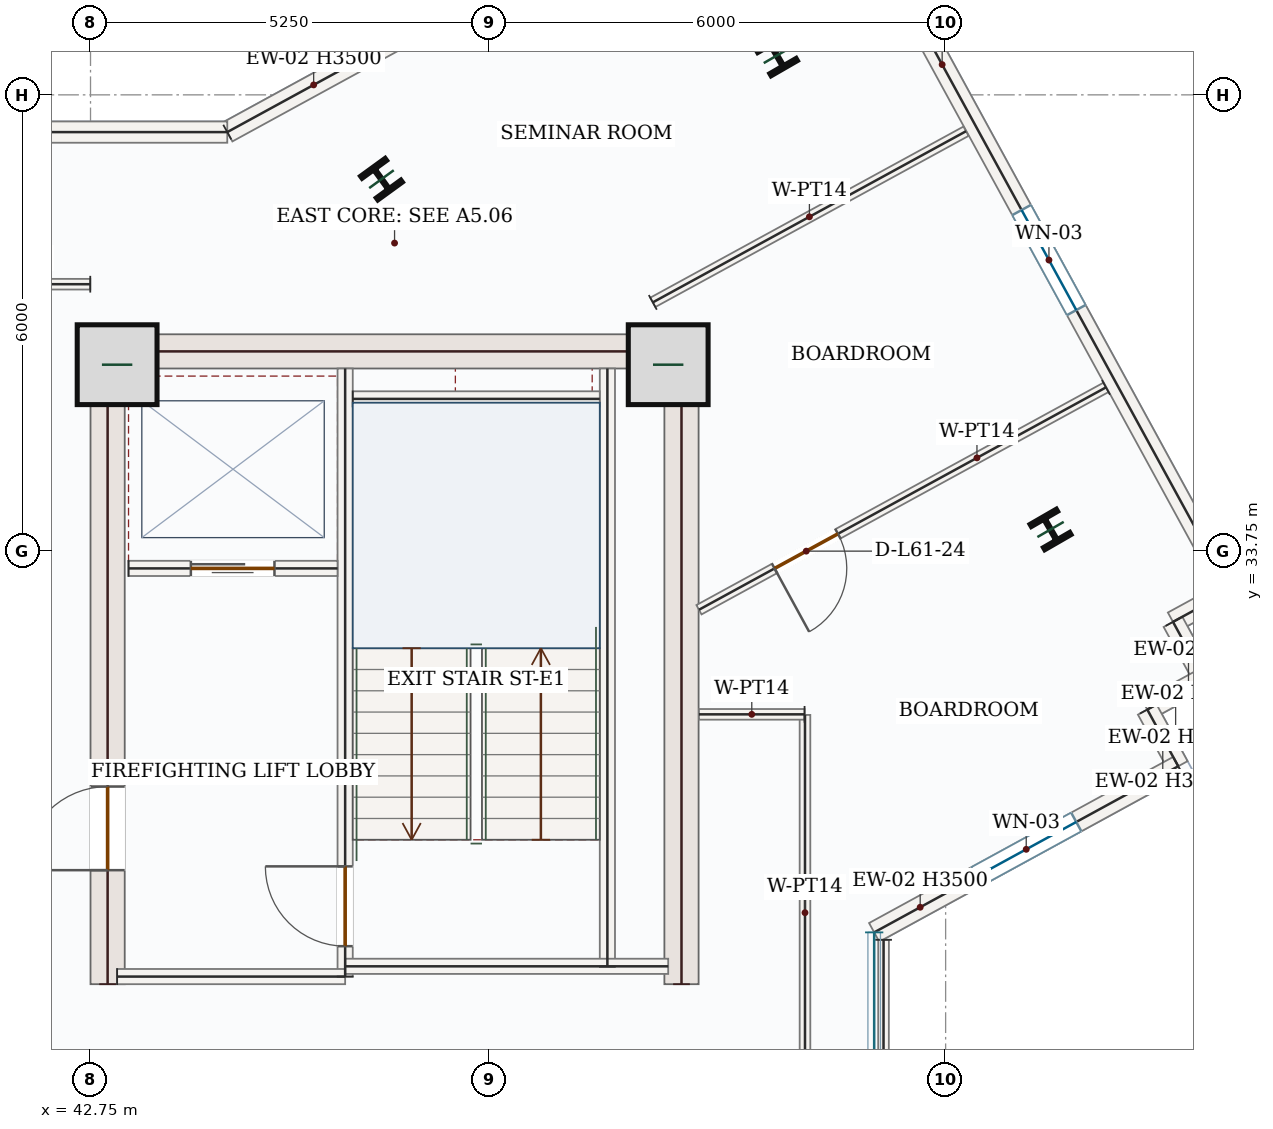
"""IFC4 building model, lengths in metres.
Left out: names, types, materials, properties, quantities, classifications, styles, units other than length and angle.
Written with IfcOpenShell. Run it as: python <this file> out.ifc"""

import sys

from ifc_helpers import new_model, si_unit, direction, frame, frame_2d, origin, origin_2d, place, context, subcontext, project, spatial, rectangle, i_section, extrude, source, transform, mapped, element, fill, save


model = new_model("IFC4")
c1 = context("Model", 3, precision=1e-05, world=origin(), true_north=direction((0.0, 1.0)))
c2 = subcontext(c1, "Body", "Model", "MODEL_VIEW")
j1 = project(units=[si_unit("LENGTHUNIT", "METRE"), si_unit("PLANEANGLEUNIT", "RADIAN")], contexts=[c1])
p1 = place(None, origin())
s1 = spatial("IfcSite", under=j1, at=p1, CompositionType="ELEMENT")
p2 = place(p1, origin())
s2 = spatial("IfcBuilding", under=s1, at=p2, CompositionType="ELEMENT")
p3 = place(p2, frame((0.0, 0.0, 257.85)))
s3 = spatial("IfcBuildingStorey", under=s2, at=p3, CompositionType="ELEMENT", Elevation=257.85)
p4 = place(p3, frame((42.975, 28.05, 0.0), z_axis=(0.0, 0.0, 1.0), x_axis=(0.0, 1.0, 0.0)))
e1 = element("IfcWall", 1, at=p4, inside=s3, PredefinedType="SHEAR", context=c2, shape_type="SweptSolid", body=[
    extrude(rectangle(XDim=8.55, YDim=0.45, at=frame_2d((4.275, 0.0))), origin(), (0.0, 0.0, 1.0), 3.5),
])
p5 = place(p4, frame((1.5, 0.0, 0.0)))
e2 = element("IfcOpeningElement", 2, at=p5, cuts=e1, PredefinedType="OPENING", context=c2, shape_type="SweptSolid", body=[
    extrude(rectangle(XDim=1.1, YDim=2.2, at=frame_2d((0.55, 1.1))), frame((0.0, 0.235, 0.0), z_axis=(0.0, -1.0, 0.0), x_axis=(1.0, 0.0, 0.0)), (0.0, 0.0, 1.0), 0.47),
])
m1 = source(origin(), c2, "Body", "SweptSolid", [
    extrude(rectangle(XDim=8.55, YDim=0.45, at=frame_2d((4.275, 0.0))), origin(), (0.0, 0.0, 1.0), 3.5),
])
p6 = place(p3, frame((50.525, 28.05, 0.0), z_axis=(0.0, 0.0, 1.0), x_axis=(0.0, 1.0, 0.0)))
e3 = element("IfcWall", 3, at=p6, inside=s3, PredefinedType="SHEAR", context=c2, shape_type="MappedRepresentation", body=[
    mapped(m1, transform((0.0, 0.0, 0.0), x_axis=(1.0, 0.0, 0.0), y_axis=(0.0, 1.0, 0.0), z_axis=(0.0, 0.0, 1.0), scale=1.0)),
])
m2 = source(origin(), c2, "Body", "SweptSolid", [
    extrude(rectangle(XDim=7.1, YDim=0.45, at=frame_2d((3.55, 0.0))), origin(), (0.0, 0.0, 1.0), 3.5),
])
p7 = place(p3, frame((43.2, 36.375, 0.0), z_axis=(0.0, 0.0, 1.0), x_axis=(1.0, 0.0, 0.0)))
e4 = element("IfcWall", 4, at=p7, inside=s3, PredefinedType="SHEAR", context=c2, shape_type="MappedRepresentation", body=[
    mapped(m2, transform((0.0, 0.0, 0.0), x_axis=(1.0, 0.0, 0.0), y_axis=(0.0, 1.0, 0.0), z_axis=(0.0, 0.0, 1.0), scale=1.0)),
])
m3 = source(origin(), c2, "Body", "SweptSolid", [
    extrude(rectangle(XDim=1.05, YDim=1.05, at=origin_2d()), origin(), (0.0, 0.0, 1.0), 3.75),
])
for number, where, z_axis, x_axis in (
    (5, (43.1, 36.2, 0.0), (0.0, 0.0, 1.0), (1.0, 0.0, 0.0)),
    (6, (50.35, 36.2, 0.0), (0.0, 0.0, 1.0), (1.0, 0.0, 0.0)),
):
    element("IfcColumn", number, at=place(p3, frame(where, z_axis=z_axis, x_axis=x_axis)), inside=s3, PredefinedType="COLUMN", context=c2, shape_type="MappedRepresentation", body=[
        mapped(m3, transform((0.0, 0.0, 0.0), x_axis=(1.0, 0.0, 0.0), y_axis=(0.0, 1.0, 0.0), z_axis=(0.0, 0.0, 1.0), scale=1.0)),
    ])
m4 = source(origin(), c2, "Body", "SweptSolid", [
    extrude(i_section(OverallWidth=0.399, OverallDepth=0.386, WebThickness=0.021, FlangeThickness=0.033, FilletRadius=0.018, at=origin_2d()), origin(), (0.0, 0.0, 1.0), 3.75),
])
for number, where, z_axis, x_axis in (
    (7, (46.578, 38.641, 0.0), (0.0, 0.0, 1.0), (0.809, 0.588, 0.0)),
    (8, (55.38, 34.032, 0.0), (0.0, 0.0, 1.0), (0.866, 0.5, 0.0)),
    (9, (51.78, 40.268, 0.0), (0.0, 0.0, 1.0), (0.866, 0.5, 0.0)),
):
    element("IfcColumn", number, at=place(p3, frame(where, z_axis=z_axis, x_axis=x_axis)), inside=s3, PredefinedType="COLUMN", context=c2, shape_type="MappedRepresentation", body=[
        mapped(m4, transform((0.0, 0.0, 0.0), x_axis=(1.0, 0.0, 0.0), y_axis=(0.0, 1.0, 0.0), z_axis=(0.0, 0.0, 1.0), scale=1.0)),
    ])
p8 = place(p3, frame((44.549, 39.26, 0.0), z_axis=(0.0, 0.0, 1.0), x_axis=(0.877569176667, 0.479450039279, 0.0)))
e10 = element("IfcWall", 10, at=p8, inside=s3, PredefinedType="SOLIDWALL", context=c2, shape_type="SweptSolid", body=[
    extrude(rectangle(XDim=6.979, YDim=0.28, at=frame_2d((3.49, 0.0))), origin(), (0.0, 0.0, 1.0), 3.5),
])
p9 = place(p8, frame((2.74, 0.0, 0.85)))
e11 = element("IfcOpeningElement", 11, at=p9, cuts=e10, PredefinedType="OPENING", context=c2, shape_type="SweptSolid", body=[
    extrude(rectangle(XDim=1.5, YDim=1.5, at=frame_2d((0.75, 0.75))), frame((0.0, 0.15, 0.0), z_axis=(0.0, -1.0, 0.0), x_axis=(1.0, 0.0, 0.0)), (0.0, 0.0, 1.0), 0.3),
])
p10 = place(p3, frame((52.981, 41.929, 0.0), z_axis=(0.0, 0.0, 1.0), x_axis=(0.479472774144, -0.877556755347, 0.0)))
e12 = element("IfcWall", 12, at=p10, inside=s3, PredefinedType="SOLIDWALL", context=c2, shape_type="SweptSolid", body=[
    extrude(rectangle(XDim=9.92, YDim=0.28, at=frame_2d((4.96, 0.0))), origin(), (0.0, 0.0, 1.0), 3.5),
])
p11 = place(p10, frame((4.21, 0.0, 0.85)))
e13 = element("IfcOpeningElement", 13, at=p11, cuts=e12, PredefinedType="OPENING", context=c2, shape_type="SweptSolid", body=[
    extrude(rectangle(XDim=1.5, YDim=1.5, at=frame_2d((0.75, 0.75))), frame((0.0, 0.15, 0.0), z_axis=(0.0, -1.0, 0.0), x_axis=(1.0, 0.0, 0.0)), (0.0, 0.0, 1.0), 0.3),
])
m5 = source(origin(), c2, "Body", "SweptSolid", [
    extrude(rectangle(XDim=0.85, YDim=0.28, at=frame_2d((0.425, 0.0))), origin(), (0.0, 0.0, 1.0), 3.5),
])
p12 = place(p3, frame((57.737, 33.224, 0.0), z_axis=(0.0, 0.0, 1.0), x_axis=(-0.87752219781, -0.479536017782, 0.0)))
e14 = element("IfcWall", 14, at=p12, inside=s3, PredefinedType="SOLIDWALL", context=c2, shape_type="MappedRepresentation", body=[
    mapped(m5, transform((0.0, 0.0, 0.0), x_axis=(1.0, 0.0, 0.0), y_axis=(0.0, 1.0, 0.0), z_axis=(0.0, 0.0, 1.0), scale=1.0)),
])
m6 = source(origin(), c2, "Body", "SweptSolid", [
    extrude(rectangle(XDim=0.85, YDim=0.28, at=frame_2d((0.425, 0.0))), origin(), (0.0, 0.0, 1.0), 3.5),
])
for number, where, z_axis, x_axis in (
    (15, (56.991, 32.816, 0.0), (0.0, 0.0, 1.0), (0.479, -0.878, 0.0)),
    (16, (57.399, 32.071, 0.0), (0.0, 0.0, 1.0), (-0.878, -0.479, 0.0)),
):
    element("IfcWall", number, at=place(p3, frame(where, z_axis=z_axis, x_axis=x_axis)), inside=s3, PredefinedType="SOLIDWALL", context=c2, shape_type="MappedRepresentation", body=[
        mapped(m6, transform((0.0, 0.0, 0.0), x_axis=(1.0, 0.0, 0.0), y_axis=(0.0, 1.0, 0.0), z_axis=(0.0, 0.0, 1.0), scale=1.0)),
    ])
m7 = source(origin(), c2, "Body", "SweptSolid", [
    extrude(rectangle(XDim=0.85, YDim=0.28, at=frame_2d((0.425, 0.0))), origin(), (0.0, 0.0, 1.0), 3.5),
])
p13 = place(p3, frame((56.653, 31.663, 0.0), z_axis=(0.0, 0.0, 1.0), x_axis=(0.479314855696, -0.877643019177, 0.0)))
e17 = element("IfcWall", 17, at=p13, inside=s3, PredefinedType="SOLIDWALL", context=c2, shape_type="MappedRepresentation", body=[
    mapped(m7, transform((0.0, 0.0, 0.0), x_axis=(1.0, 0.0, 0.0), y_axis=(0.0, 1.0, 0.0), z_axis=(0.0, 0.0, 1.0), scale=1.0)),
])
p14 = place(p3, frame((57.06, 30.917, 0.0), z_axis=(0.0, 0.0, 1.0), x_axis=(-0.877563774399, -0.479459927276, 0.0)))
e18 = element("IfcWall", 18, at=p14, inside=s3, PredefinedType="SOLIDWALL", context=c2, shape_type="SweptSolid", body=[
    extrude(rectangle(XDim=4.558, YDim=0.28, at=frame_2d((2.279, 0.0))), origin(), (0.0, 0.0, 1.0), 3.5),
])
p15 = place(p14, frame((1.529, 0.0, 0.85)))
e19 = element("IfcOpeningElement", 19, at=p15, cuts=e18, PredefinedType="OPENING", context=c2, shape_type="SweptSolid", body=[
    extrude(rectangle(XDim=1.5, YDim=1.5, at=frame_2d((0.75, 0.75))), frame((0.0, 0.15, 0.0), z_axis=(0.0, -1.0, 0.0), x_axis=(1.0, 0.0, 0.0)), (0.0, 0.0, 1.0), 0.3),
])
m8 = source(origin(), c2, "Body", "SweptSolid", [
    extrude(rectangle(XDim=7.658, YDim=0.28, at=frame_2d((3.829, 0.0))), origin(), (0.0, 0.0, 1.0), 2.772),
])
p16 = place(p3, frame((36.891, 39.26, 0.0), z_axis=(0.0, 0.0, 1.0), x_axis=(1.0, 0.0, 0.0)))
e20 = element("IfcWall", 20, at=p16, inside=s3, PredefinedType="SOLIDWALL", context=c2, shape_type="MappedRepresentation", body=[
    mapped(m8, transform((0.0, 0.0, 0.0), x_axis=(1.0, 0.0, 0.0), y_axis=(0.0, 1.0, 0.0), z_axis=(0.0, 0.0, 1.0), scale=1.0)),
])
m9 = source(origin(), c2, "Body", "SweptSolid", [
    extrude(rectangle(XDim=7.87, YDim=0.2, at=frame_2d((3.935, 0.0))), origin(), (0.0, 0.0, 1.0), 3.5),
])
p17 = place(p3, frame((49.55, 28.28, 0.0), z_axis=(0.0, 0.0, 1.0), x_axis=(0.0, 1.0, 0.0)))
e21 = element("IfcWall", 21, at=p17, inside=s3, PredefinedType="SOLIDWALL", context=c2, shape_type="MappedRepresentation", body=[
    mapped(m9, transform((0.0, 0.0, 0.0), x_axis=(1.0, 0.0, 0.0), y_axis=(0.0, 1.0, 0.0), z_axis=(0.0, 0.0, 1.0), scale=1.0)),
])
p18 = place(p3, frame((46.1, 28.15, 0.0), z_axis=(0.0, 0.0, 1.0), x_axis=(0.0, 1.0, 0.0)))
e22 = element("IfcWall", 22, at=p18, inside=s3, PredefinedType="SOLIDWALL", context=c2, shape_type="SweptSolid", body=[
    extrude(rectangle(XDim=8.0, YDim=0.2, at=frame_2d((4.0, 0.0))), origin(), (0.0, 0.0, 1.0), 3.5),
])
p19 = place(p18, frame((0.4, 0.0, 0.0)))
e23 = element("IfcOpeningElement", 23, at=p19, cuts=e22, PredefinedType="OPENING", context=c2, shape_type="SweptSolid", body=[
    extrude(rectangle(XDim=1.05, YDim=2.15, at=frame_2d((0.525, 1.075))), frame((0.0, 0.11, 0.0), z_axis=(0.0, -1.0, 0.0), x_axis=(1.0, 0.0, 0.0)), (0.0, 0.0, 1.0), 0.22),
])
m10 = source(origin(), c2, "Body", "SweptSolid", [
    extrude(rectangle(XDim=3.0, YDim=0.2, at=frame_2d((1.5, 0.0))), origin(), (0.0, 0.0, 1.0), 3.5),
])
p20 = place(p3, frame((43.1, 28.15, 0.0), z_axis=(0.0, 0.0, 1.0), x_axis=(1.0, 0.0, 0.0)))
e24 = element("IfcWall", 24, at=p20, inside=s3, PredefinedType="SOLIDWALL", context=c2, shape_type="MappedRepresentation", body=[
    mapped(m10, transform((0.0, 0.0, 0.0), x_axis=(1.0, 0.0, 0.0), y_axis=(0.0, 1.0, 0.0), z_axis=(0.0, 0.0, 1.0), scale=1.0)),
])
m11 = source(origin(), c2, "Body", "SweptSolid", [
    extrude(rectangle(XDim=4.25, YDim=0.2, at=frame_2d((2.125, 0.0))), origin(), (0.0, 0.0, 1.0), 3.5),
])
p21 = place(p3, frame((46.1, 28.285, 0.0), z_axis=(0.0, 0.0, 1.0), x_axis=(1.0, 0.0, 0.0)))
e25 = element("IfcWall", 25, at=p21, inside=s3, PredefinedType="SOLIDWALL", context=c2, shape_type="MappedRepresentation", body=[
    mapped(m11, transform((0.0, 0.0, 0.0), x_axis=(1.0, 0.0, 0.0), y_axis=(0.0, 1.0, 0.0), z_axis=(0.0, 0.0, 1.0), scale=1.0)),
])
m12 = source(origin(), c2, "Body", "SweptSolid", [
    extrude(rectangle(XDim=3.25, YDim=0.2, at=frame_2d((1.625, 0.0))), origin(), (0.0, 0.0, 1.0), 3.5),
])
p22 = place(p3, frame((46.2, 35.75, 0.0), z_axis=(0.0, 0.0, 1.0), x_axis=(1.0, 0.0, 0.0)))
e26 = element("IfcWall", 26, at=p22, inside=s3, PredefinedType="SOLIDWALL", context=c2, shape_type="MappedRepresentation", body=[
    mapped(m12, transform((0.0, 0.0, 0.0), x_axis=(1.0, 0.0, 0.0), y_axis=(0.0, 1.0, 0.0), z_axis=(0.0, 0.0, 1.0), scale=1.0)),
])
p23 = place(p3, frame((43.25, 33.52, 0.0), z_axis=(0.0, 0.0, 1.0), x_axis=(1.0, 0.0, 0.0)))
e27 = element("IfcWall", 27, at=p23, inside=s3, PredefinedType="SOLIDWALL", context=c2, shape_type="SweptSolid", body=[
    extrude(rectangle(XDim=2.75, YDim=0.2, at=frame_2d((1.375, 0.0))), origin(), (0.0, 0.0, 1.0), 3.5),
])
p24 = place(p23, frame((0.82, 0.0, 0.0)))
e28 = element("IfcOpeningElement", 28, at=p24, cuts=e27, PredefinedType="OPENING", context=c2, shape_type="SweptSolid", body=[
    extrude(rectangle(XDim=1.1, YDim=2.15, at=frame_2d((0.55, 1.075))), frame((0.0, 0.11, 0.0), z_axis=(0.0, -1.0, 0.0), x_axis=(1.0, 0.0, 0.0)), (0.0, 0.0, 1.0), 0.22),
])
m13 = source(origin(), c2, "Body", "SweptSolid", [
    extrude(rectangle(XDim=4.695, YDim=0.14, at=frame_2d((2.348, 0.0))), origin(), (0.0, 0.0, 1.0), 3.5),
])
p25 = place(p3, frame((50.148, 37.02, 0.0), z_axis=(0.0, 0.0, 1.0), x_axis=(0.877559526902, 0.479467701461, 0.0)))
e29 = element("IfcWall", 29, at=p25, inside=s3, PredefinedType="PARTITIONING", context=c2, shape_type="MappedRepresentation", body=[
    mapped(m13, transform((0.0, 0.0, 0.0), x_axis=(1.0, 0.0, 0.0), y_axis=(0.0, 1.0, 0.0), z_axis=(0.0, 0.0, 1.0), scale=1.0)),
])
p26 = place(p3, frame((56.109, 35.901, 0.0), z_axis=(0.0, 0.0, 1.0), x_axis=(-0.877574248726, -0.479440755436, 0.0)))
e30 = element("IfcWall", 30, at=p26, inside=s3, PredefinedType="PARTITIONING", context=c2, shape_type="SweptSolid", body=[
    extrude(rectangle(XDim=6.102, YDim=0.14, at=frame_2d((3.051, 0.0))), origin(), (0.0, 0.0, 1.0), 3.5),
])
p27 = place(p26, frame((4.018, 0.0, 0.0)))
e31 = element("IfcOpeningElement", 31, at=p27, cuts=e30, PredefinedType="OPENING", context=c2, shape_type="SweptSolid", body=[
    extrude(rectangle(XDim=0.95, YDim=2.15, at=frame_2d((0.475, 1.075))), frame((0.0, 0.08, 0.0), z_axis=(0.0, -1.0, 0.0), x_axis=(1.0, 0.0, 0.0)), (0.0, 0.0, 1.0), 0.16),
])
p28 = place(p3, frame((52.15, 22.406, 0.0), z_axis=(0.0, 0.0, 1.0), x_axis=(-2.657666e-05, 0.999999999647, 0.0)))
e32 = element("IfcWall", 32, at=p28, inside=s3, PredefinedType="PARTITIONING", context=c2, shape_type="SweptSolid", body=[
    extrude(rectangle(XDim=9.186, YDim=0.14, at=frame_2d((4.593, 0.0))), origin(), (0.0, 0.0, 1.0), 3.5),
])
p29 = place(p28, frame((2.883, 0.0, 0.0)))
e33 = element("IfcOpeningElement", 33, at=p29, cuts=e32, PredefinedType="OPENING", context=c2, shape_type="SweptSolid", body=[
    extrude(rectangle(XDim=0.95, YDim=2.15, at=frame_2d((0.475, 1.075))), frame((0.0, 0.08, 0.0), z_axis=(0.0, -1.0, 0.0), x_axis=(1.0, 0.0, 0.0)), (0.0, 0.0, 1.0), 0.16),
])
m14 = source(origin(), c2, "Body", "SweptSolid", [
    extrude(rectangle(XDim=1.389, YDim=0.14, at=frame_2d((0.695, 0.0))), origin(), (0.0, 0.0, 1.0), 3.5),
])
p30 = place(p3, frame((52.144, 31.6, 0.0), z_axis=(0.0, 0.0, 1.0), x_axis=(-1.0, 0.0, 0.0)))
e34 = element("IfcWall", 34, at=p30, inside=s3, PredefinedType="PARTITIONING", context=c2, shape_type="MappedRepresentation", body=[
    mapped(m14, transform((0.0, 0.0, 0.0), x_axis=(1.0, 0.0, 0.0), y_axis=(0.0, 1.0, 0.0), z_axis=(0.0, 0.0, 1.0), scale=1.0)),
])
m15 = source(origin(), c2, "Body", "SweptSolid", [
    extrude(rectangle(XDim=6.722, YDim=0.14, at=frame_2d((3.361, 0.0))), origin(), (0.0, 0.0, 1.0), 3.5),
])
p31 = place(p3, frame((53.184, 28.634, 0.0), z_axis=(0.0, 0.0, 1.0), x_axis=(-0.000544820492, -0.999999851585, 0.0)))
e35 = element("IfcWall", 35, at=p31, inside=s3, PredefinedType="PARTITIONING", context=c2, shape_type="MappedRepresentation", body=[
    mapped(m15, transform((0.0, 0.0, 0.0), x_axis=(1.0, 0.0, 0.0), y_axis=(0.0, 1.0, 0.0), z_axis=(0.0, 0.0, 1.0), scale=1.0)),
])
p32 = place(p3, frame((42.747, 37.259, 0.0), z_axis=(0.0, 0.0, 1.0), x_axis=(-0.99999994699, 0.000325605609, 0.0)))
e36 = element("IfcWall", 36, at=p32, inside=s3, PredefinedType="PARTITIONING", context=c2, shape_type="SweptSolid", body=[
    extrude(rectangle(XDim=3.749, YDim=0.14, at=frame_2d((1.875, 0.0))), origin(), (0.0, 0.0, 1.0), 3.5),
])
p33 = place(p32, frame((2.183, 0.0, 0.0)))
e37 = element("IfcOpeningElement", 37, at=p33, cuts=e36, PredefinedType="OPENING", context=c2, shape_type="SweptSolid", body=[
    extrude(rectangle(XDim=0.95, YDim=2.15, at=frame_2d((0.475, 1.075))), frame((0.0, 0.08, 0.0), z_axis=(0.0, -1.0, 0.0), x_axis=(1.0, 0.0, 0.0)), (0.0, 0.0, 1.0), 0.16),
])
m16 = source(origin(), c2, "Body", "SweptSolid", [
    extrude(rectangle(XDim=1.5, YDim=1.5, at=frame_2d((0.75, 0.75))), frame((0.0, 0.03, 0.0), z_axis=(0.0, -1.0, 0.0), x_axis=(1.0, 0.0, 0.0)), (0.0, 0.0, 1.0), 0.06),
])
p34 = place(p11, origin())
e38 = element("IfcWindow", 38, at=p34, inside=s3, PartitioningType="SINGLE_PANEL", PredefinedType="WINDOW", context=c2, shape_type="MappedRepresentation", body=[
    mapped(m16, transform((0.0, 0.0, 0.0), x_axis=(1.0, 0.0, 0.0), y_axis=(0.0, 1.0, 0.0), z_axis=(0.0, 0.0, 1.0), scale=1.0)),
])
fill(e13, e38)
p35 = place(p15, origin())
e39 = element("IfcWindow", 39, at=p35, inside=s3, PartitioningType="SINGLE_PANEL", PredefinedType="WINDOW", context=c2, shape_type="MappedRepresentation", body=[
    mapped(m16, transform((0.0, 0.0, 0.0), x_axis=(1.0, 0.0, 0.0), y_axis=(0.0, 1.0, 0.0), z_axis=(0.0, 0.0, 1.0), scale=1.0)),
])
fill(e19, e39)
m17 = source(origin(), c2, "Body", "SweptSolid", [
    extrude(rectangle(XDim=1.05, YDim=2.15, at=frame_2d((0.525, 1.075))), frame((0.0, 0.025, 0.0), z_axis=(0.0, -1.0, 0.0), x_axis=(1.0, 0.0, 0.0)), (0.0, 0.0, 1.0), 0.05),
])
p36 = place(p19, origin())
e40 = element("IfcDoor", 40, at=p36, inside=s3, OperationType="SINGLE_SWING_RIGHT", PredefinedType="DOOR", context=c2, shape_type="MappedRepresentation", body=[
    mapped(m17, transform((0.0, 0.0, 0.0), x_axis=(1.0, 0.0, 0.0), y_axis=(0.0, 1.0, 0.0), z_axis=(0.0, 0.0, 1.0), scale=1.0)),
])
fill(e23, e40)
m18 = source(origin(), c2, "Body", "SweptSolid", [
    extrude(rectangle(XDim=1.1, YDim=2.15, at=frame_2d((0.55, 1.075))), frame((0.0, 0.025, 0.0), z_axis=(0.0, -1.0, 0.0), x_axis=(1.0, 0.0, 0.0)), (0.0, 0.0, 1.0), 0.05),
])
p37 = place(p24, origin())
e41 = element("IfcDoor", 41, at=p37, inside=s3, OperationType="DOUBLE_DOOR_SLIDING", PredefinedType="DOOR", context=c2, shape_type="MappedRepresentation", body=[
    mapped(m18, transform((0.0, 0.0, 0.0), x_axis=(1.0, 0.0, 0.0), y_axis=(0.0, 1.0, 0.0), z_axis=(0.0, 0.0, 1.0), scale=1.0)),
])
fill(e28, e41)
m19 = source(origin(), c2, "Body", "SweptSolid", [
    extrude(rectangle(XDim=1.1, YDim=2.2, at=frame_2d((0.55, 1.1))), frame((0.0, 0.025, 0.0), z_axis=(0.0, -1.0, 0.0), x_axis=(1.0, 0.0, 0.0)), (0.0, 0.0, 1.0), 0.05),
])
p38 = place(p5, origin())
e42 = element("IfcDoor", 42, at=p38, inside=s3, OperationType="SINGLE_SWING_LEFT", PredefinedType="DOOR", context=c2, shape_type="MappedRepresentation", body=[
    mapped(m19, transform((0.0, 0.0, 0.0), x_axis=(1.0, 0.0, 0.0), y_axis=(0.0, 1.0, 0.0), z_axis=(0.0, 0.0, 1.0), scale=1.0)),
])
fill(e2, e42)
m20 = source(origin(), c2, "Body", "SweptSolid", [
    extrude(rectangle(XDim=0.95, YDim=2.15, at=frame_2d((0.475, 1.075))), frame((0.0, 0.025, 0.0), z_axis=(0.0, -1.0, 0.0), x_axis=(1.0, 0.0, 0.0)), (0.0, 0.0, 1.0), 0.05),
])
p39 = place(p27, origin())
e43 = element("IfcDoor", 43, at=p39, inside=s3, OperationType="SINGLE_SWING_RIGHT", PredefinedType="DOOR", context=c2, shape_type="MappedRepresentation", body=[
    mapped(m20, transform((0.0, 0.0, 0.0), x_axis=(1.0, 0.0, 0.0), y_axis=(0.0, 1.0, 0.0), z_axis=(0.0, 0.0, 1.0), scale=1.0)),
])
fill(e31, e43)
save(model, sys.argv[1])
